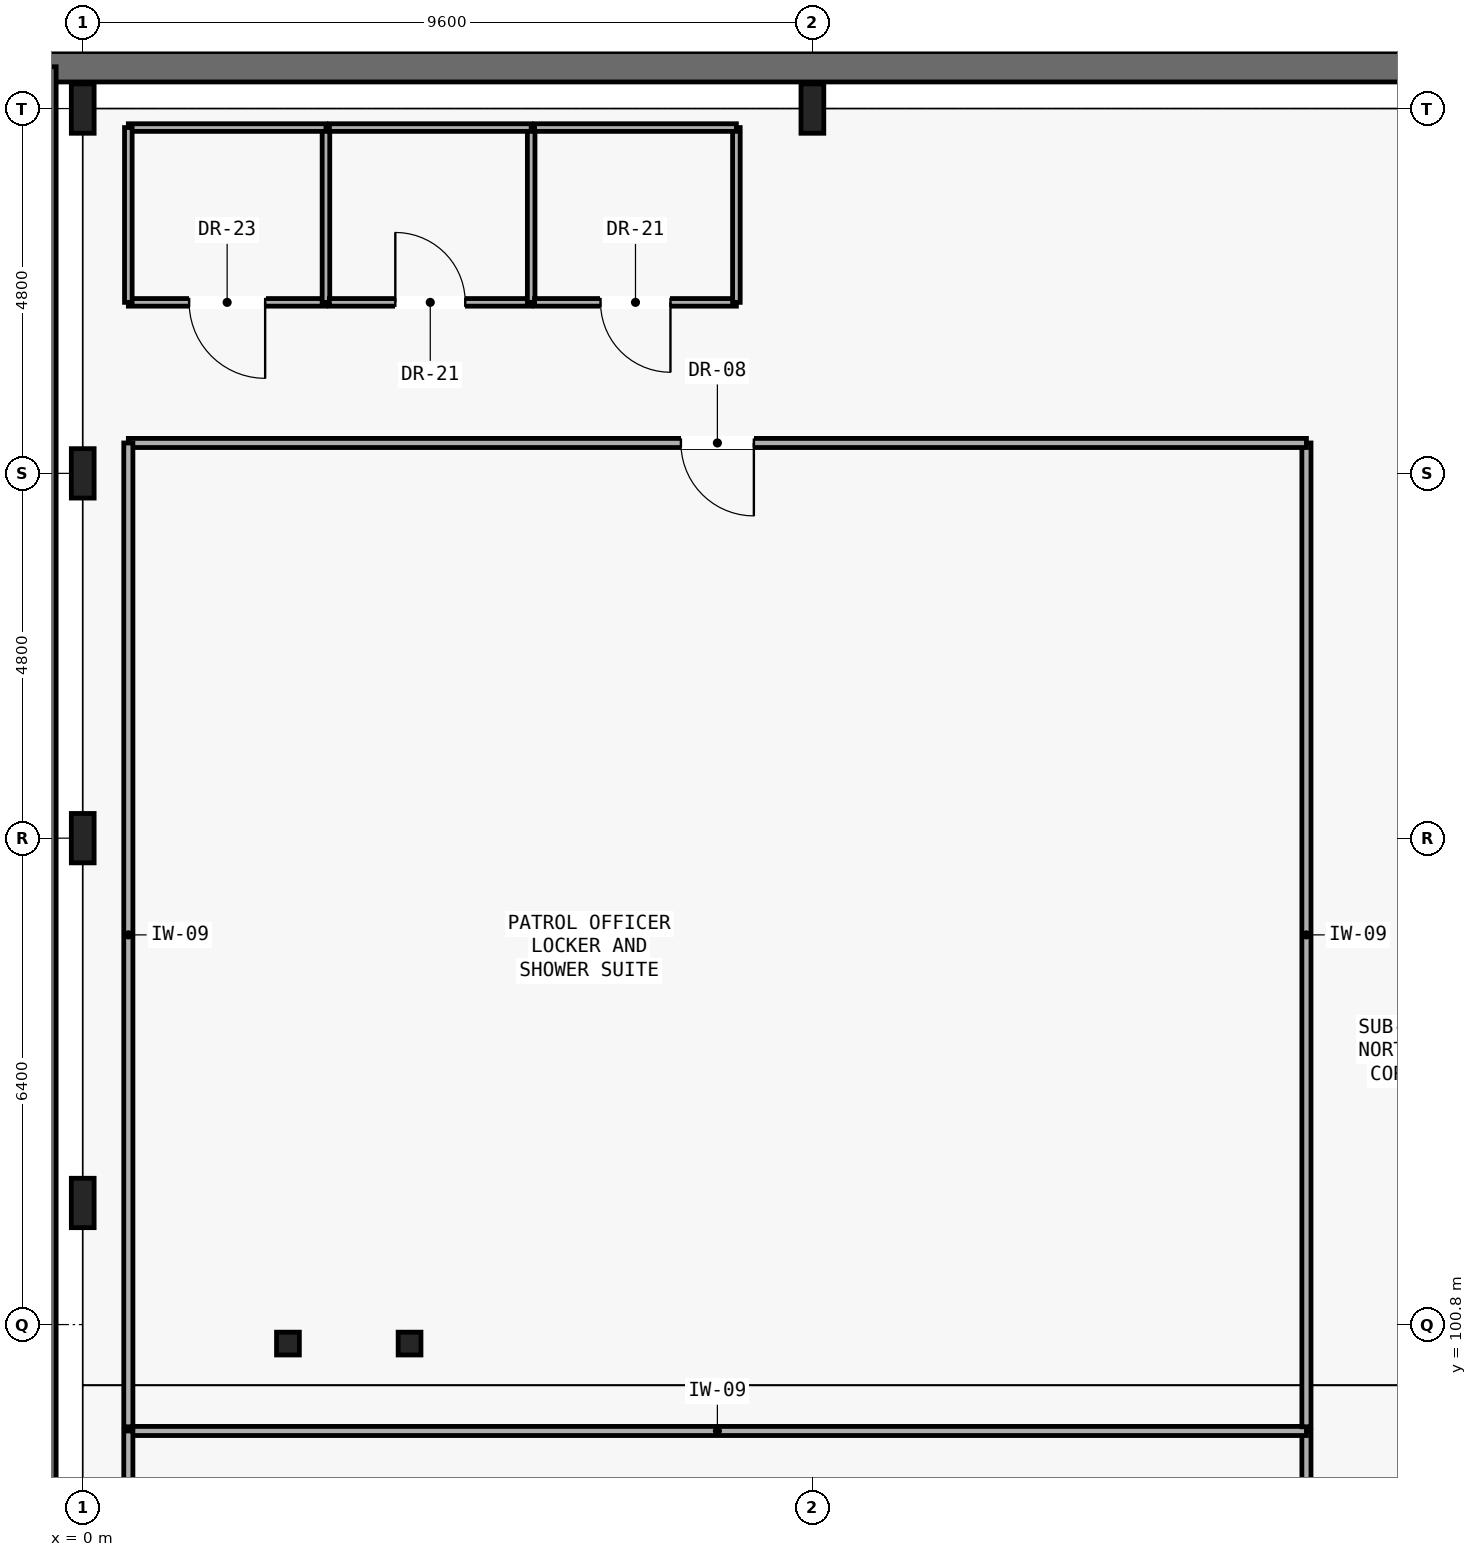
"""IFC4 building model, lengths in metres.
Left out: names, types, materials, properties, quantities, classifications, styles, units other than length and angle.
Written with IfcOpenShell. Run it as: python <this file> out.ifc"""

import sys

from ifc_helpers import new_model, si_unit, direction, frame, frame_2d, origin, origin_2d, place, context, subcontext, project, spatial, rectangle, i_section, extrude, element, fill, save


model = new_model("IFC4")
c1 = context("Model", 3, precision=1e-05, world=origin(), true_north=direction((0.0, 1.0)))
c2 = subcontext(c1, "Body", "Model", "MODEL_VIEW")
j1 = project(units=[si_unit("LENGTHUNIT", "METRE"), si_unit("PLANEANGLEUNIT", "RADIAN")], contexts=[c1])
p1 = place(None, origin())
s1 = spatial("IfcSite", under=j1, at=p1, CompositionType="ELEMENT")
p2 = place(p1, origin())
s2 = spatial("IfcBuilding", under=s1, at=p2, CompositionType="ELEMENT")
p3 = place(p2, frame((0.0, 0.0, -4.55)))
s3 = spatial("IfcBuildingStorey", under=s2, at=p3, CompositionType="ELEMENT", Elevation=-4.55)
for number, where, z_axis, x_axis in (
    (1, (0.0, 102.4, 0.0), (0.0, 0.0, 1.0), (1.0, 0.0, 0.0)),
    (2, (0.0, 107.2, 0.0), (0.0, 0.0, 1.0), (1.0, 0.0, 0.0)),
    (3, (0.0, 112.0, 0.0), (0.0, 0.0, 1.0), (1.0, 0.0, 0.0)),
    (4, (0.0, 116.8, 0.0), (0.0, 0.0, 1.0), (1.0, 0.0, 0.0)),
    (5, (9.6, 116.8, 0.0), (0.0, 0.0, 1.0), (1.0, 0.0, 0.0)),
):
    element("IfcColumn", number, at=place(p3, frame(where, z_axis=z_axis, x_axis=x_axis)), inside=s3, PredefinedType="COLUMN", context=c2, shape_type="SweptSolid", body=[
        extrude(i_section(OverallWidth=0.3, OverallDepth=0.65, WebThickness=0.016, FlangeThickness=0.031, FilletRadius=0.027, at=origin_2d()), origin(), (0.0, 0.0, 1.0), 4.55),
    ])
p4 = place(p3, frame((-0.55, 117.35, 0.0), z_axis=(0.0, 0.0, 1.0), x_axis=(1.0, 0.0, 0.0)))
e6 = element("IfcWall", 6, at=p4, inside=s3, PredefinedType="USERDEFINED", context=c2, shape_type="SweptSolid", body=[
    extrude(rectangle(XDim=87.5, YDim=0.4, at=frame_2d((43.75, 0.0))), origin(), (0.0, 0.0, 1.0), 4.28),
])
p5 = place(p3, frame((-0.55, 28.25, 0.0), z_axis=(0.0, 0.0, 1.0), x_axis=(0.0, 1.0, 0.0)))
e7 = element("IfcWall", 7, at=p5, inside=s3, PredefinedType="USERDEFINED", context=c2, shape_type="SweptSolid", body=[
    extrude(rectangle(XDim=89.1, YDim=0.4, at=frame_2d((44.55, 0.0))), origin(), (0.0, 0.0, 1.0), 4.28),
])
for number, where, z_axis, x_axis in (
    (8, (2.7, 100.55, 0.0), (0.0, 0.0, 1.0), (1.0, 0.0, 0.0)),
    (9, (4.3, 100.55, 0.0), (0.0, 0.0, 1.0), (1.0, 0.0, 0.0)),
):
    element("IfcColumn", number, at=place(p3, frame(where, z_axis=z_axis, x_axis=x_axis)), inside=s3, PredefinedType="COLUMN", context=c2, shape_type="SweptSolid", body=[
        extrude(i_section(OverallWidth=0.3, OverallDepth=0.3, WebThickness=0.011, FlangeThickness=0.019, FilletRadius=0.027, at=origin_2d()), origin(), (0.0, 0.0, 1.0), 4.55),
    ])
p6 = place(p3, frame((16.1, 83.8, 0.0), z_axis=(0.0, 0.0, 1.0), x_axis=(0.0, 1.0, 0.0)))
e10 = element("IfcWall", 10, at=p6, inside=s3, PredefinedType="PARTITIONING", context=c2, shape_type="SweptSolid", body=[
    extrude(rectangle(XDim=15.6, YDim=0.12, at=frame_2d((7.8, 0.0))), origin(), (0.0, 0.0, 1.0), 4.28),
])
p7 = place(p6, frame((7.31, 0.0, 0.0)))
e11 = element("IfcOpeningElement", 11, at=p7, cuts=e10, PredefinedType="OPENING", context=c2, shape_type="SweptSolid", body=[
    extrude(rectangle(XDim=0.98, YDim=2.1, at=frame_2d((0.49, 1.05))), frame((0.0, 0.07, 0.0), z_axis=(0.0, -1.0, 0.0), x_axis=(1.0, 0.0, 0.0)), (0.0, 0.0, 1.0), 0.14),
])
p8 = place(p3, frame((16.1, 99.4, 0.0), z_axis=(0.0, 0.0, 1.0), x_axis=(-1.0, 0.0, 0.0)))
e12 = element("IfcWall", 12, at=p8, inside=s3, PredefinedType="PARTITIONING", context=c2, shape_type="SweptSolid", body=[
    extrude(rectangle(XDim=15.5, YDim=0.12, at=frame_2d((7.75, 0.0))), origin(), (0.0, 0.0, 1.0), 4.28),
])
p9 = place(p3, frame((0.6, 99.4, 0.0), z_axis=(0.0, 0.0, 1.0), x_axis=(0.0, -1.0, 0.0)))
e13 = element("IfcWall", 13, at=p9, inside=s3, PredefinedType="PARTITIONING", context=c2, shape_type="SweptSolid", body=[
    extrude(rectangle(XDim=15.6, YDim=0.12, at=frame_2d((7.8, 0.0))), origin(), (0.0, 0.0, 1.0), 4.28),
])
p10 = place(p3, frame((16.1, 99.455, 0.0), z_axis=(0.0, 0.0, 1.0), x_axis=(0.0, 1.0, 0.0)))
e14 = element("IfcWall", 14, at=p10, inside=s3, PredefinedType="PARTITIONING", context=c2, shape_type="SweptSolid", body=[
    extrude(rectangle(XDim=12.945, YDim=0.12, at=frame_2d((6.472, 0.0))), origin(), (0.0, 0.0, 1.0), 4.28),
])
p11 = place(p3, frame((16.1, 112.4, 0.0), z_axis=(0.0, 0.0, 1.0), x_axis=(-1.0, 0.0, 0.0)))
e15 = element("IfcWall", 15, at=p11, inside=s3, PredefinedType="PARTITIONING", context=c2, shape_type="SweptSolid", body=[
    extrude(rectangle(XDim=15.5, YDim=0.12, at=frame_2d((7.75, 0.0))), origin(), (0.0, 0.0, 1.0), 4.28),
])
p12 = place(p11, frame((7.27, 0.0, 0.0)))
e16 = element("IfcOpeningElement", 16, at=p12, cuts=e15, PredefinedType="OPENING", context=c2, shape_type="SweptSolid", body=[
    extrude(rectangle(XDim=0.96, YDim=2.08, at=frame_2d((0.48, 1.04))), frame((0.0, 0.07, 0.0), z_axis=(0.0, -1.0, 0.0), x_axis=(1.0, 0.0, 0.0)), (0.0, 0.0, 1.0), 0.14),
])
p13 = place(p3, frame((0.6, 112.4, 0.0), z_axis=(0.0, 0.0, 1.0), x_axis=(0.0, -1.0, 0.0)))
e17 = element("IfcWall", 17, at=p13, inside=s3, PredefinedType="PARTITIONING", context=c2, shape_type="SweptSolid", body=[
    extrude(rectangle(XDim=12.945, YDim=0.12, at=frame_2d((6.472, 0.0))), origin(), (0.0, 0.0, 1.0), 4.28),
])
p14 = place(p3, frame((0.6, 114.25, 0.0), z_axis=(0.0, 0.0, 1.0), x_axis=(1.0, 0.0, 0.0)))
e18 = element("IfcWall", 18, at=p14, inside=s3, PredefinedType="PARTITIONING", context=c2, shape_type="SweptSolid", body=[
    extrude(rectangle(XDim=2.6, YDim=0.1, at=frame_2d((1.3, 0.0))), origin(), (0.0, 0.0, 1.0), 3.76),
])
p15 = place(p14, frame((0.8, 0.0, 0.0)))
e19 = element("IfcOpeningElement", 19, at=p15, cuts=e18, PredefinedType="OPENING", context=c2, shape_type="SweptSolid", body=[
    extrude(rectangle(XDim=1.0, YDim=2.08, at=frame_2d((0.5, 1.04))), frame((0.0, 0.06, 0.0), z_axis=(0.0, -1.0, 0.0), x_axis=(1.0, 0.0, 0.0)), (0.0, 0.0, 1.0), 0.12),
])
p16 = place(p3, frame((3.2, 114.25, 0.0), z_axis=(0.0, 0.0, 1.0), x_axis=(0.0, 1.0, 0.0)))
e20 = element("IfcWall", 20, at=p16, inside=s3, PredefinedType="PARTITIONING", context=c2, shape_type="SweptSolid", body=[
    extrude(rectangle(XDim=2.3, YDim=0.1, at=frame_2d((1.15, 0.0))), origin(), (0.0, 0.0, 1.0), 4.28),
])
p17 = place(p3, frame((3.2, 116.55, 0.0), z_axis=(0.0, 0.0, 1.0), x_axis=(-1.0, 0.0, 0.0)))
e21 = element("IfcWall", 21, at=p17, inside=s3, PredefinedType="PARTITIONING", context=c2, shape_type="SweptSolid", body=[
    extrude(rectangle(XDim=2.6, YDim=0.1, at=frame_2d((1.3, 0.0))), origin(), (0.0, 0.0, 1.0), 3.36),
])
p18 = place(p3, frame((0.6, 116.55, 0.0), z_axis=(0.0, 0.0, 1.0), x_axis=(0.0, -1.0, 0.0)))
e22 = element("IfcWall", 22, at=p18, inside=s3, PredefinedType="PARTITIONING", context=c2, shape_type="SweptSolid", body=[
    extrude(rectangle(XDim=2.3, YDim=0.1, at=frame_2d((1.15, 0.0))), origin(), (0.0, 0.0, 1.0), 4.28),
])
p19 = place(p3, frame((3.245, 114.25, 0.0), z_axis=(0.0, 0.0, 1.0), x_axis=(1.0, 0.0, 0.0)))
e23 = element("IfcWall", 23, at=p19, inside=s3, PredefinedType="PARTITIONING", context=c2, shape_type="SweptSolid", body=[
    extrude(rectangle(XDim=2.655, YDim=0.1, at=frame_2d((1.327, 0.0))), origin(), (0.0, 0.0, 1.0), 3.76),
])
p20 = place(p19, frame((0.867, 0.0, 0.0)))
e24 = element("IfcOpeningElement", 24, at=p20, cuts=e23, PredefinedType="OPENING", context=c2, shape_type="SweptSolid", body=[
    extrude(rectangle(XDim=0.92, YDim=2.08, at=frame_2d((0.46, 1.04))), frame((0.0, 0.06, 0.0), z_axis=(0.0, -1.0, 0.0), x_axis=(1.0, 0.0, 0.0)), (0.0, 0.0, 1.0), 0.12),
])
p21 = place(p3, frame((5.9, 114.25, 0.0), z_axis=(0.0, 0.0, 1.0), x_axis=(0.0, 1.0, 0.0)))
e25 = element("IfcWall", 25, at=p21, inside=s3, PredefinedType="PARTITIONING", context=c2, shape_type="SweptSolid", body=[
    extrude(rectangle(XDim=2.3, YDim=0.1, at=frame_2d((1.15, 0.0))), origin(), (0.0, 0.0, 1.0), 4.28),
])
p22 = place(p3, frame((5.9, 116.55, 0.0), z_axis=(0.0, 0.0, 1.0), x_axis=(-1.0, 0.0, 0.0)))
e26 = element("IfcWall", 26, at=p22, inside=s3, PredefinedType="PARTITIONING", context=c2, shape_type="SweptSolid", body=[
    extrude(rectangle(XDim=2.655, YDim=0.1, at=frame_2d((1.327, 0.0))), origin(), (0.0, 0.0, 1.0), 3.36),
])
p23 = place(p3, frame((5.945, 114.25, 0.0), z_axis=(0.0, 0.0, 1.0), x_axis=(1.0, 0.0, 0.0)))
e27 = element("IfcWall", 27, at=p23, inside=s3, PredefinedType="PARTITIONING", context=c2, shape_type="SweptSolid", body=[
    extrude(rectangle(XDim=2.655, YDim=0.1, at=frame_2d((1.328, 0.0))), origin(), (0.0, 0.0, 1.0), 3.76),
])
p24 = place(p23, frame((0.867, 0.0, 0.0)))
e28 = element("IfcOpeningElement", 28, at=p24, cuts=e27, PredefinedType="OPENING", context=c2, shape_type="SweptSolid", body=[
    extrude(rectangle(XDim=0.92, YDim=2.08, at=frame_2d((0.46, 1.04))), frame((0.0, 0.06, 0.0), z_axis=(0.0, -1.0, 0.0), x_axis=(1.0, 0.0, 0.0)), (0.0, 0.0, 1.0), 0.12),
])
p25 = place(p3, frame((8.6, 114.25, 0.0), z_axis=(0.0, 0.0, 1.0), x_axis=(0.0, 1.0, 0.0)))
e29 = element("IfcWall", 29, at=p25, inside=s3, PredefinedType="PARTITIONING", context=c2, shape_type="SweptSolid", body=[
    extrude(rectangle(XDim=2.3, YDim=0.1, at=frame_2d((1.15, 0.0))), origin(), (0.0, 0.0, 1.0), 4.28),
])
p26 = place(p3, frame((8.6, 116.55, 0.0), z_axis=(0.0, 0.0, 1.0), x_axis=(-1.0, 0.0, 0.0)))
e30 = element("IfcWall", 30, at=p26, inside=s3, PredefinedType="PARTITIONING", context=c2, shape_type="SweptSolid", body=[
    extrude(rectangle(XDim=2.655, YDim=0.1, at=frame_2d((1.328, 0.0))), origin(), (0.0, 0.0, 1.0), 3.36),
])
p27 = place(p12, origin())
e31 = element("IfcDoor", 31, at=p27, inside=s3, OperationType="SINGLE_SWING_LEFT", PredefinedType="DOOR", context=c2, shape_type="SweptSolid", body=[
    extrude(rectangle(XDim=0.96, YDim=2.08, at=frame_2d((0.48, 1.04))), frame((0.0, 0.025, 0.0), z_axis=(0.0, -1.0, 0.0), x_axis=(1.0, 0.0, 0.0)), (0.0, 0.0, 1.0), 0.05),
])
fill(e16, e31)
p28 = place(p15, frame((1.0, 0.0, 0.0), z_axis=(0.0, 0.0, 1.0), x_axis=(-1.0, 0.0, 0.0)))
e32 = element("IfcDoor", 32, at=p28, inside=s3, OperationType="SINGLE_SWING_RIGHT", PredefinedType="DOOR", context=c2, shape_type="SweptSolid", body=[
    extrude(rectangle(XDim=1.0, YDim=2.08, at=frame_2d((0.5, 1.04))), frame((0.0, 0.025, 0.0), z_axis=(0.0, -1.0, 0.0), x_axis=(1.0, 0.0, 0.0)), (0.0, 0.0, 1.0), 0.05),
])
fill(e19, e32)
p29 = place(p20, origin())
e33 = element("IfcDoor", 33, at=p29, inside=s3, OperationType="SINGLE_SWING_LEFT", PredefinedType="DOOR", context=c2, shape_type="SweptSolid", body=[
    extrude(rectangle(XDim=0.92, YDim=2.08, at=frame_2d((0.46, 1.04))), frame((0.0, 0.025, 0.0), z_axis=(0.0, -1.0, 0.0), x_axis=(1.0, 0.0, 0.0)), (0.0, 0.0, 1.0), 0.05),
])
fill(e24, e33)
p30 = place(p24, frame((0.92, 0.0, 0.0), z_axis=(0.0, 0.0, 1.0), x_axis=(-1.0, 0.0, 0.0)))
e34 = element("IfcDoor", 34, at=p30, inside=s3, OperationType="SINGLE_SWING_RIGHT", PredefinedType="DOOR", context=c2, shape_type="SweptSolid", body=[
    extrude(rectangle(XDim=0.92, YDim=2.08, at=frame_2d((0.46, 1.04))), frame((0.0, 0.025, 0.0), z_axis=(0.0, -1.0, 0.0), x_axis=(1.0, 0.0, 0.0)), (0.0, 0.0, 1.0), 0.05),
])
fill(e28, e34)
save(model, sys.argv[1])
